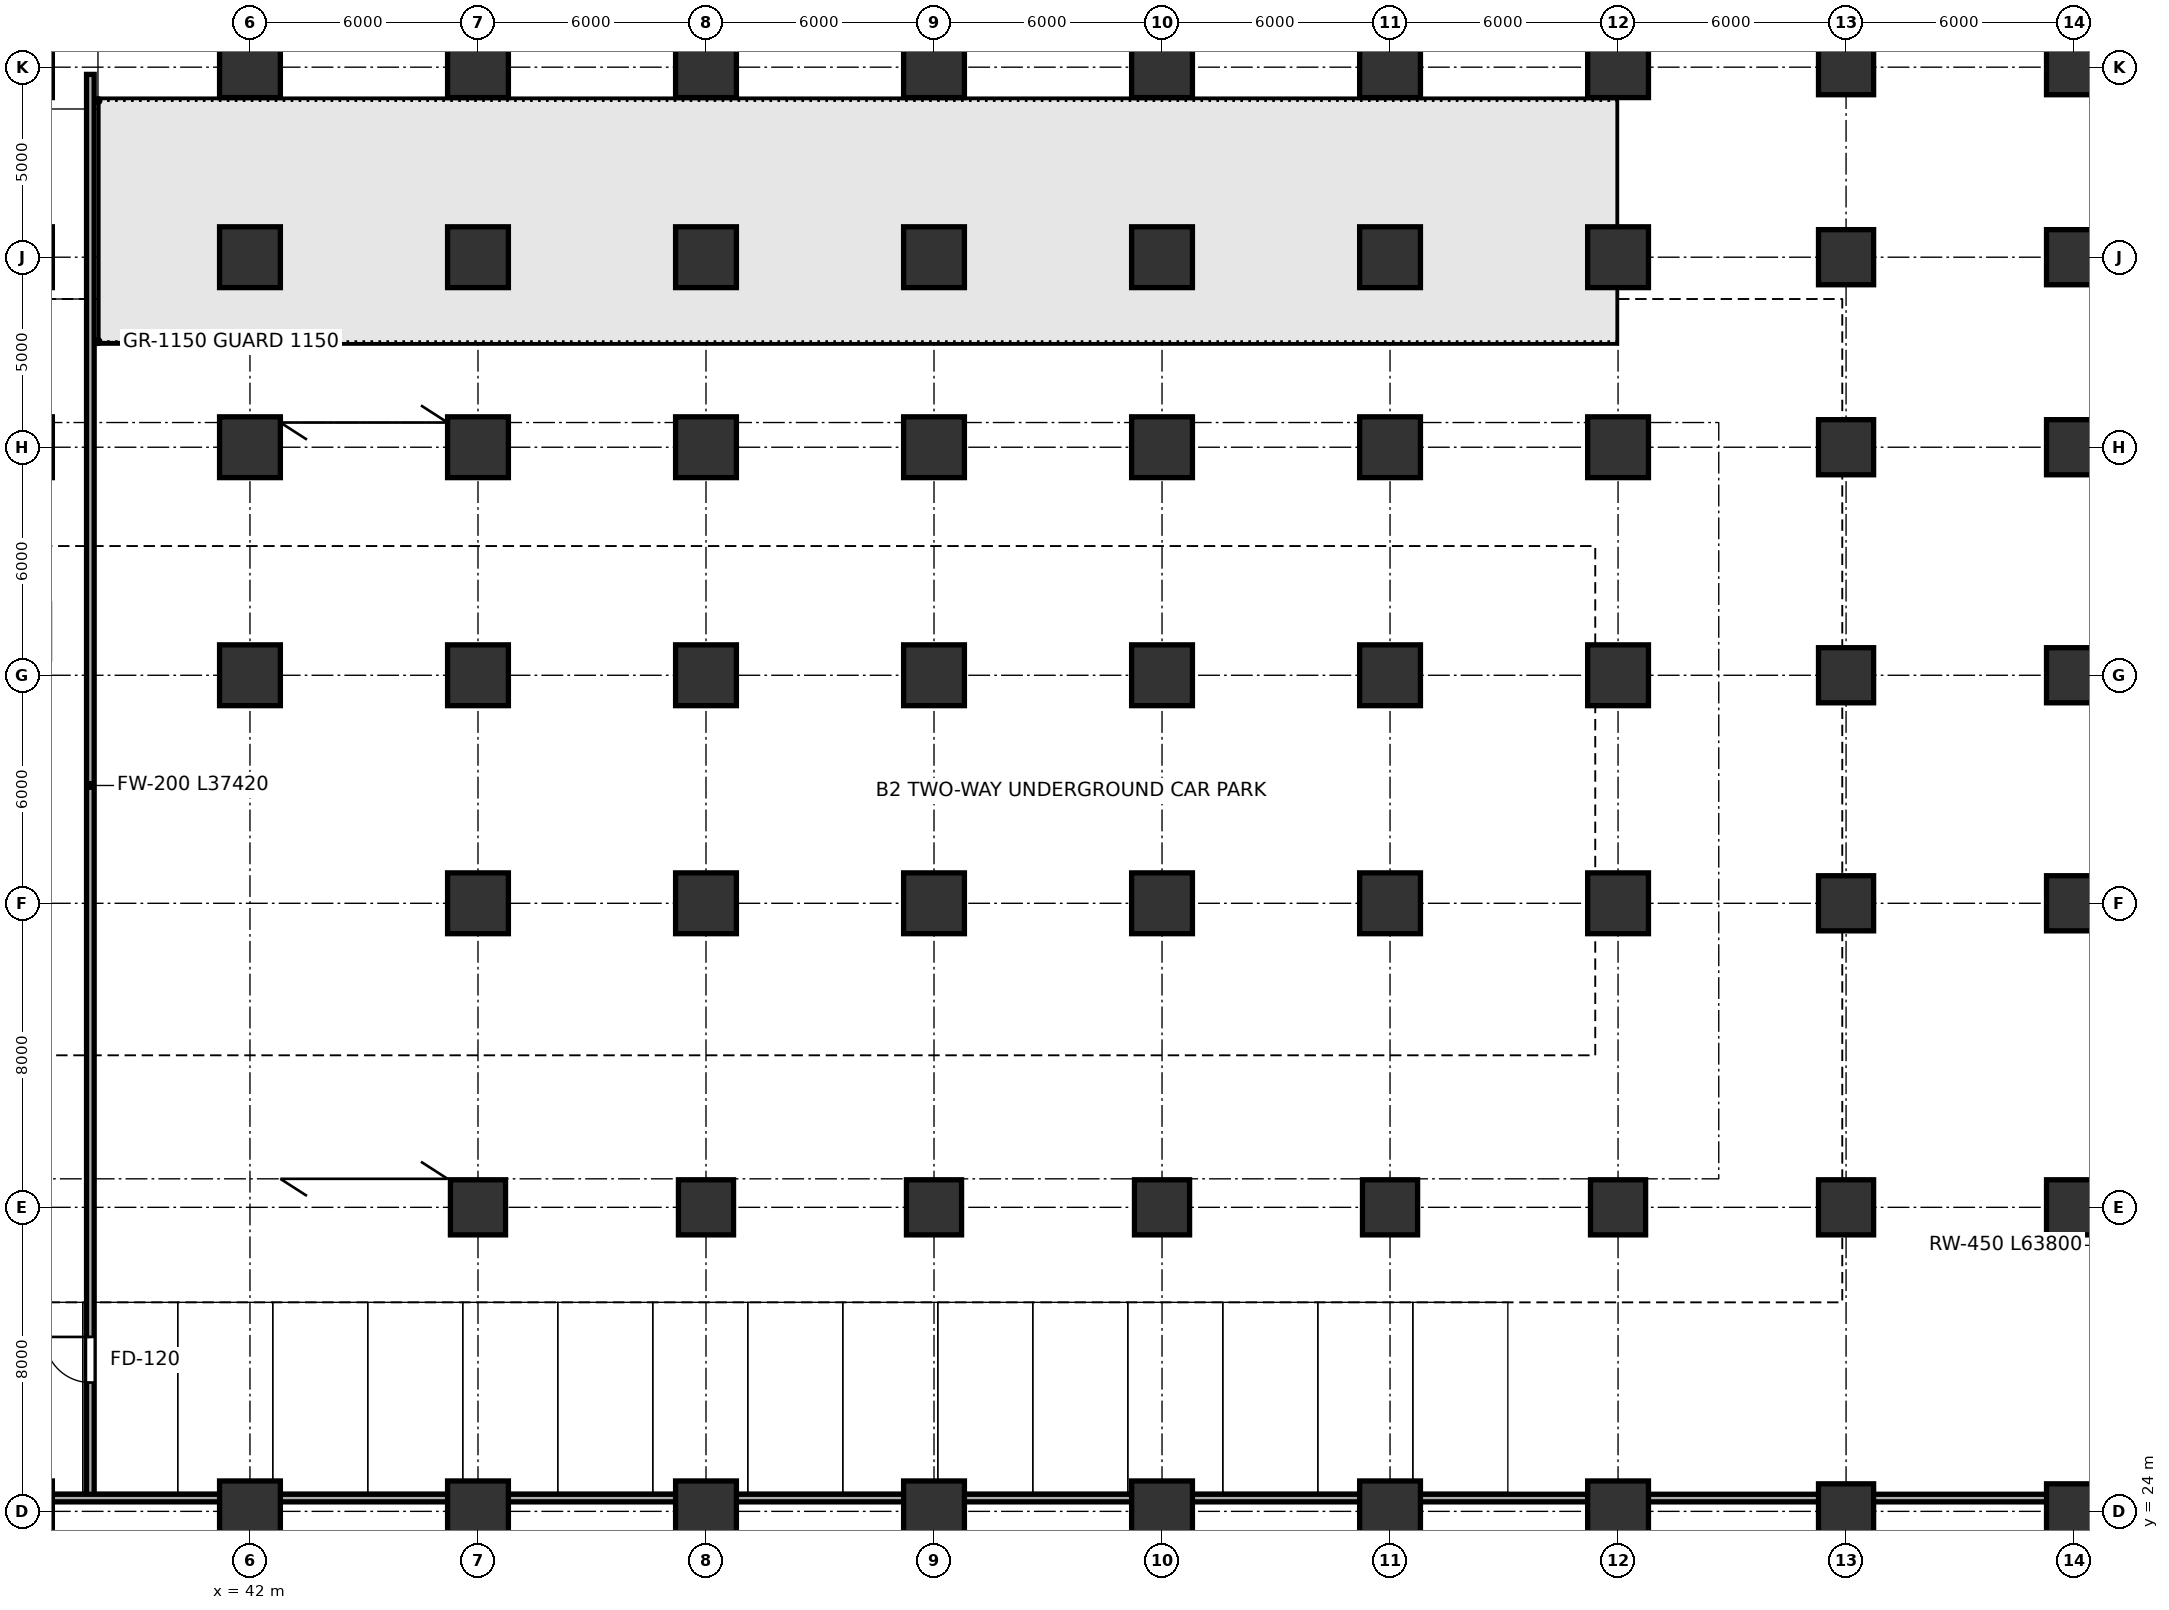
"""IFC4 building model, lengths in metres.
Left out: names, types, materials, properties, quantities, classifications, styles, units other than length and angle.
Written with IfcOpenShell. Run it as: python <this file> out.ifc"""

import sys

from ifc_helpers import new_model, si_unit, direction, frame, frame_2d, origin, origin_2d, place, context, subcontext, project, spatial, rectangle, extrude, source, transform, mapped, element, fill, save


model = new_model("IFC4")
c1 = context("Model", 3, precision=1e-05, world=origin(), true_north=direction((0.0, 1.0)))
c2 = subcontext(c1, "Body", "Model", "MODEL_VIEW")
j1 = project(units=[si_unit("LENGTHUNIT", "METRE"), si_unit("PLANEANGLEUNIT", "RADIAN")], contexts=[c1])
p1 = place(None, origin())
s1 = spatial("IfcSite", under=j1, at=p1, CompositionType="ELEMENT")
p2 = place(p1, origin())
s2 = spatial("IfcBuilding", under=s1, at=p2, CompositionType="ELEMENT")
p3 = place(p2, frame((0.0, 0.0, -9.6)))
s3 = spatial("IfcBuildingStorey", under=s2, at=p3, CompositionType="ELEMENT", Elevation=-9.6)
m1 = source(origin(), c2, "Body", "SweptSolid", [
    extrude(rectangle(XDim=1.6, YDim=1.6, at=origin_2d()), origin(), (0.0, 0.0, 1.0), 4.799),
])
for number, where, z_axis, x_axis in (
    (1, (42.0, 24.0, 0.0), (0.0, 0.0, 1.0), (1.0, 0.0, 0.0)),
    (2, (42.0, 46.0, 0.0), (0.0, 0.0, 1.0), (1.0, 0.0, 0.0)),
    (3, (42.0, 52.0, 0.0), (0.0, 0.0, 1.0), (1.0, 0.0, 0.0)),
    (4, (42.0, 57.0, 0.0), (0.0, 0.0, 1.0), (1.0, 0.0, 0.0)),
):
    element("IfcColumn", number, at=place(p3, frame(where, z_axis=z_axis, x_axis=x_axis)), inside=s3, PredefinedType="COLUMN", context=c2, shape_type="MappedRepresentation", body=[
        mapped(m1, transform((0.0, 0.0, 0.0), scale=1.0)),
    ])
m2 = source(origin(), c2, "Body", "SweptSolid", [
    extrude(rectangle(XDim=1.6, YDim=1.6, at=origin_2d()), origin(), (0.0, 0.0, 1.0), 4.799),
])
p4 = place(p3, frame((42.0, 62.0, 0.0), z_axis=(0.0, 0.0, 1.0), x_axis=(1.0, 0.0, 0.0)))
e5 = element("IfcColumn", 5, at=p4, inside=s3, PredefinedType="COLUMN", context=c2, shape_type="MappedRepresentation", body=[
    mapped(m2, transform((0.0, 0.0, 0.0), scale=1.0)),
])
p5 = place(p3, frame((48.0, 24.0, 0.0), z_axis=(0.0, 0.0, 1.0), x_axis=(1.0, 0.0, 0.0)))
e6 = element("IfcColumn", 6, at=p5, inside=s3, PredefinedType="COLUMN", context=c2, shape_type="MappedRepresentation", body=[
    mapped(m1, transform((0.0, 0.0, 0.0), scale=1.0)),
])
m3 = source(origin(), c2, "Body", "SweptSolid", [
    extrude(rectangle(XDim=1.45, YDim=1.45, at=origin_2d()), origin(), (0.0, 0.0, 1.0), 4.799),
])
p6 = place(p3, frame((48.0, 32.0, 0.0), z_axis=(0.0, 0.0, 1.0), x_axis=(1.0, 0.0, 0.0)))
e7 = element("IfcColumn", 7, at=p6, inside=s3, PredefinedType="COLUMN", context=c2, shape_type="MappedRepresentation", body=[
    mapped(m3, transform((0.0, 0.0, 0.0), scale=1.0)),
])
for number, where, z_axis, x_axis in (
    (8, (48.0, 40.0, 0.0), (0.0, 0.0, 1.0), (1.0, 0.0, 0.0)),
    (9, (48.0, 46.0, 0.0), (0.0, 0.0, 1.0), (1.0, 0.0, 0.0)),
    (10, (48.0, 52.0, 0.0), (0.0, 0.0, 1.0), (1.0, 0.0, 0.0)),
    (11, (48.0, 57.0, 0.0), (0.0, 0.0, 1.0), (1.0, 0.0, 0.0)),
):
    element("IfcColumn", number, at=place(p3, frame(where, z_axis=z_axis, x_axis=x_axis)), inside=s3, PredefinedType="COLUMN", context=c2, shape_type="MappedRepresentation", body=[
        mapped(m1, transform((0.0, 0.0, 0.0), scale=1.0)),
    ])
p7 = place(p3, frame((48.0, 62.0, 0.0), z_axis=(0.0, 0.0, 1.0), x_axis=(1.0, 0.0, 0.0)))
e12 = element("IfcColumn", 12, at=p7, inside=s3, PredefinedType="COLUMN", context=c2, shape_type="MappedRepresentation", body=[
    mapped(m2, transform((0.0, 0.0, 0.0), scale=1.0)),
])
p8 = place(p3, frame((54.0, 24.0, 0.0), z_axis=(0.0, 0.0, 1.0), x_axis=(1.0, 0.0, 0.0)))
e13 = element("IfcColumn", 13, at=p8, inside=s3, PredefinedType="COLUMN", context=c2, shape_type="MappedRepresentation", body=[
    mapped(m1, transform((0.0, 0.0, 0.0), scale=1.0)),
])
p9 = place(p3, frame((54.0, 32.0, 0.0), z_axis=(0.0, 0.0, 1.0), x_axis=(1.0, 0.0, 0.0)))
e14 = element("IfcColumn", 14, at=p9, inside=s3, PredefinedType="COLUMN", context=c2, shape_type="MappedRepresentation", body=[
    mapped(m3, transform((0.0, 0.0, 0.0), scale=1.0)),
])
for number, where, z_axis, x_axis in (
    (15, (54.0, 40.0, 0.0), (0.0, 0.0, 1.0), (1.0, 0.0, 0.0)),
    (16, (54.0, 46.0, 0.0), (0.0, 0.0, 1.0), (1.0, 0.0, 0.0)),
    (17, (54.0, 52.0, 0.0), (0.0, 0.0, 1.0), (1.0, 0.0, 0.0)),
    (18, (54.0, 57.0, 0.0), (0.0, 0.0, 1.0), (1.0, 0.0, 0.0)),
):
    element("IfcColumn", number, at=place(p3, frame(where, z_axis=z_axis, x_axis=x_axis)), inside=s3, PredefinedType="COLUMN", context=c2, shape_type="MappedRepresentation", body=[
        mapped(m1, transform((0.0, 0.0, 0.0), scale=1.0)),
    ])
p10 = place(p3, frame((54.0, 62.0, 0.0), z_axis=(0.0, 0.0, 1.0), x_axis=(1.0, 0.0, 0.0)))
e19 = element("IfcColumn", 19, at=p10, inside=s3, PredefinedType="COLUMN", context=c2, shape_type="MappedRepresentation", body=[
    mapped(m2, transform((0.0, 0.0, 0.0), scale=1.0)),
])
p11 = place(p3, frame((60.0, 24.0, 0.0), z_axis=(0.0, 0.0, 1.0), x_axis=(1.0, 0.0, 0.0)))
e20 = element("IfcColumn", 20, at=p11, inside=s3, PredefinedType="COLUMN", context=c2, shape_type="MappedRepresentation", body=[
    mapped(m1, transform((0.0, 0.0, 0.0), scale=1.0)),
])
p12 = place(p3, frame((60.0, 32.0, 0.0), z_axis=(0.0, 0.0, 1.0), x_axis=(1.0, 0.0, 0.0)))
e21 = element("IfcColumn", 21, at=p12, inside=s3, PredefinedType="COLUMN", context=c2, shape_type="MappedRepresentation", body=[
    mapped(m3, transform((0.0, 0.0, 0.0), scale=1.0)),
])
for number, where, z_axis, x_axis in (
    (22, (60.0, 40.0, 0.0), (0.0, 0.0, 1.0), (1.0, 0.0, 0.0)),
    (23, (60.0, 46.0, 0.0), (0.0, 0.0, 1.0), (1.0, 0.0, 0.0)),
    (24, (60.0, 52.0, 0.0), (0.0, 0.0, 1.0), (1.0, 0.0, 0.0)),
    (25, (60.0, 57.0, 0.0), (0.0, 0.0, 1.0), (1.0, 0.0, 0.0)),
):
    element("IfcColumn", number, at=place(p3, frame(where, z_axis=z_axis, x_axis=x_axis)), inside=s3, PredefinedType="COLUMN", context=c2, shape_type="MappedRepresentation", body=[
        mapped(m1, transform((0.0, 0.0, 0.0), scale=1.0)),
    ])
p13 = place(p3, frame((60.0, 62.0, 0.0), z_axis=(0.0, 0.0, 1.0), x_axis=(1.0, 0.0, 0.0)))
e26 = element("IfcColumn", 26, at=p13, inside=s3, PredefinedType="COLUMN", context=c2, shape_type="MappedRepresentation", body=[
    mapped(m2, transform((0.0, 0.0, 0.0), scale=1.0)),
])
p14 = place(p3, frame((66.0, 24.0, 0.0), z_axis=(0.0, 0.0, 1.0), x_axis=(1.0, 0.0, 0.0)))
e27 = element("IfcColumn", 27, at=p14, inside=s3, PredefinedType="COLUMN", context=c2, shape_type="MappedRepresentation", body=[
    mapped(m1, transform((0.0, 0.0, 0.0), scale=1.0)),
])
p15 = place(p3, frame((66.0, 32.0, 0.0), z_axis=(0.0, 0.0, 1.0), x_axis=(1.0, 0.0, 0.0)))
e28 = element("IfcColumn", 28, at=p15, inside=s3, PredefinedType="COLUMN", context=c2, shape_type="MappedRepresentation", body=[
    mapped(m3, transform((0.0, 0.0, 0.0), scale=1.0)),
])
for number, where, z_axis, x_axis in (
    (29, (66.0, 40.0, 0.0), (0.0, 0.0, 1.0), (1.0, 0.0, 0.0)),
    (30, (66.0, 46.0, 0.0), (0.0, 0.0, 1.0), (1.0, 0.0, 0.0)),
    (31, (66.0, 52.0, 0.0), (0.0, 0.0, 1.0), (1.0, 0.0, 0.0)),
    (32, (66.0, 57.0, 0.0), (0.0, 0.0, 1.0), (1.0, 0.0, 0.0)),
):
    element("IfcColumn", number, at=place(p3, frame(where, z_axis=z_axis, x_axis=x_axis)), inside=s3, PredefinedType="COLUMN", context=c2, shape_type="MappedRepresentation", body=[
        mapped(m1, transform((0.0, 0.0, 0.0), scale=1.0)),
    ])
p16 = place(p3, frame((66.0, 62.0, 0.0), z_axis=(0.0, 0.0, 1.0), x_axis=(1.0, 0.0, 0.0)))
e33 = element("IfcColumn", 33, at=p16, inside=s3, PredefinedType="COLUMN", context=c2, shape_type="MappedRepresentation", body=[
    mapped(m2, transform((0.0, 0.0, 0.0), scale=1.0)),
])
p17 = place(p3, frame((72.0, 24.0, 0.0), z_axis=(0.0, 0.0, 1.0), x_axis=(1.0, 0.0, 0.0)))
e34 = element("IfcColumn", 34, at=p17, inside=s3, PredefinedType="COLUMN", context=c2, shape_type="MappedRepresentation", body=[
    mapped(m1, transform((0.0, 0.0, 0.0), scale=1.0)),
])
p18 = place(p3, frame((72.0, 32.0, 0.0), z_axis=(0.0, 0.0, 1.0), x_axis=(1.0, 0.0, 0.0)))
e35 = element("IfcColumn", 35, at=p18, inside=s3, PredefinedType="COLUMN", context=c2, shape_type="MappedRepresentation", body=[
    mapped(m3, transform((0.0, 0.0, 0.0), scale=1.0)),
])
for number, where, z_axis, x_axis in (
    (36, (72.0, 40.0, 0.0), (0.0, 0.0, 1.0), (1.0, 0.0, 0.0)),
    (37, (72.0, 46.0, 0.0), (0.0, 0.0, 1.0), (1.0, 0.0, 0.0)),
    (38, (72.0, 52.0, 0.0), (0.0, 0.0, 1.0), (1.0, 0.0, 0.0)),
    (39, (72.0, 57.0, 0.0), (0.0, 0.0, 1.0), (1.0, 0.0, 0.0)),
):
    element("IfcColumn", number, at=place(p3, frame(where, z_axis=z_axis, x_axis=x_axis)), inside=s3, PredefinedType="COLUMN", context=c2, shape_type="MappedRepresentation", body=[
        mapped(m1, transform((0.0, 0.0, 0.0), scale=1.0)),
    ])
p19 = place(p3, frame((72.0, 62.0, 0.0), z_axis=(0.0, 0.0, 1.0), x_axis=(1.0, 0.0, 0.0)))
e40 = element("IfcColumn", 40, at=p19, inside=s3, PredefinedType="COLUMN", context=c2, shape_type="MappedRepresentation", body=[
    mapped(m2, transform((0.0, 0.0, 0.0), scale=1.0)),
])
p20 = place(p3, frame((78.0, 24.0, 0.0), z_axis=(0.0, 0.0, 1.0), x_axis=(1.0, 0.0, 0.0)))
e41 = element("IfcColumn", 41, at=p20, inside=s3, PredefinedType="COLUMN", context=c2, shape_type="MappedRepresentation", body=[
    mapped(m1, transform((0.0, 0.0, 0.0), scale=1.0)),
])
p21 = place(p3, frame((78.0, 32.0, 0.0), z_axis=(0.0, 0.0, 1.0), x_axis=(1.0, 0.0, 0.0)))
e42 = element("IfcColumn", 42, at=p21, inside=s3, PredefinedType="COLUMN", context=c2, shape_type="MappedRepresentation", body=[
    mapped(m3, transform((0.0, 0.0, 0.0), scale=1.0)),
])
for number, where, z_axis, x_axis in (
    (43, (78.0, 40.0, 0.0), (0.0, 0.0, 1.0), (1.0, 0.0, 0.0)),
    (44, (78.0, 46.0, 0.0), (0.0, 0.0, 1.0), (1.0, 0.0, 0.0)),
    (45, (78.0, 52.0, 0.0), (0.0, 0.0, 1.0), (1.0, 0.0, 0.0)),
    (46, (78.0, 57.0, 0.0), (0.0, 0.0, 1.0), (1.0, 0.0, 0.0)),
):
    element("IfcColumn", number, at=place(p3, frame(where, z_axis=z_axis, x_axis=x_axis)), inside=s3, PredefinedType="COLUMN", context=c2, shape_type="MappedRepresentation", body=[
        mapped(m1, transform((0.0, 0.0, 0.0), scale=1.0)),
    ])
p22 = place(p3, frame((78.0, 62.0, 0.0), z_axis=(0.0, 0.0, 1.0), x_axis=(1.0, 0.0, 0.0)))
e47 = element("IfcColumn", 47, at=p22, inside=s3, PredefinedType="COLUMN", context=c2, shape_type="MappedRepresentation", body=[
    mapped(m2, transform((0.0, 0.0, 0.0), scale=1.0)),
])
for number, where, z_axis, x_axis in (
    (48, (84.0, 24.0, 0.0), (0.0, 0.0, 1.0), (1.0, 0.0, 0.0)),
    (49, (84.0, 32.0, 0.0), (0.0, 0.0, 1.0), (1.0, 0.0, 0.0)),
    (50, (84.0, 40.0, 0.0), (0.0, 0.0, 1.0), (1.0, 0.0, 0.0)),
    (51, (84.0, 46.0, 0.0), (0.0, 0.0, 1.0), (1.0, 0.0, 0.0)),
    (52, (84.0, 52.0, 0.0), (0.0, 0.0, 1.0), (1.0, 0.0, 0.0)),
    (53, (84.0, 57.0, 0.0), (0.0, 0.0, 1.0), (1.0, 0.0, 0.0)),
):
    element("IfcColumn", number, at=place(p3, frame(where, z_axis=z_axis, x_axis=x_axis)), inside=s3, PredefinedType="COLUMN", context=c2, shape_type="MappedRepresentation", body=[
        mapped(m3, transform((0.0, 0.0, 0.0), scale=1.0)),
    ])
m4 = source(origin(), c2, "Body", "SweptSolid", [
    extrude(rectangle(XDim=1.45, YDim=1.45, at=origin_2d()), origin(), (0.0, 0.0, 1.0), 4.799),
])
for number, where, z_axis, x_axis in (
    (54, (84.0, 62.0, 0.0), (0.0, 0.0, 1.0), (1.0, 0.0, 0.0)),
    (55, (90.0, 24.0, 0.0), (0.0, 0.0, 1.0), (1.0, 0.0, 0.0)),
    (56, (90.0, 32.0, 0.0), (0.0, 0.0, 1.0), (1.0, 0.0, 0.0)),
    (57, (90.0, 40.0, 0.0), (0.0, 0.0, 1.0), (1.0, 0.0, 0.0)),
    (58, (90.0, 46.0, 0.0), (0.0, 0.0, 1.0), (1.0, 0.0, 0.0)),
    (59, (90.0, 52.0, 0.0), (0.0, 0.0, 1.0), (1.0, 0.0, 0.0)),
    (60, (90.0, 57.0, 0.0), (0.0, 0.0, 1.0), (1.0, 0.0, 0.0)),
    (61, (90.0, 62.0, 0.0), (0.0, 0.0, 1.0), (1.0, 0.0, 0.0)),
):
    element("IfcColumn", number, at=place(p3, frame(where, z_axis=z_axis, x_axis=x_axis)), inside=s3, PredefinedType="COLUMN", context=c2, shape_type="MappedRepresentation", body=[
        mapped(m4, transform((0.0, 0.0, 0.0), scale=1.0)),
    ])
p23 = place(p3, frame((37.8, 24.39, 0.0), z_axis=(0.0, 0.0, 1.0), x_axis=(0.0, 1.0, 0.0)))
e62 = element("IfcWall", 62, at=p23, inside=s3, PredefinedType="SOLIDWALL", context=c2, shape_type="SweptSolid", body=[
    extrude(rectangle(XDim=37.42, YDim=0.2, at=frame_2d((18.71, 0.0))), origin(), (0.0, 0.0, 1.0), 3.655),
])
p24 = place(p23, frame((3.0, 0.0, 0.0)))
e63 = element("IfcOpeningElement", 63, at=p24, cuts=e62, PredefinedType="OPENING", context=c2, shape_type="SweptSolid", body=[
    extrude(rectangle(XDim=1.2, YDim=2.2, at=frame_2d((0.6, 1.1))), frame((0.0, 0.11, 0.0), z_axis=(0.0, -1.0, 0.0), x_axis=(1.0, 0.0, 0.0)), (0.0, 0.0, 1.0), 0.22),
])
p25 = place(p3, frame((27.24, 24.35, 0.0), z_axis=(0.0, 0.0, 1.0), x_axis=(1.0, 0.0, 0.0)))
e64 = element("IfcWall", 64, at=p25, inside=s3, PredefinedType="SOLIDWALL", context=c2, shape_type="SweptSolid", body=[
    extrude(rectangle(XDim=62.22, YDim=0.2, at=frame_2d((31.11, 0.0))), origin(), (0.0, 0.0, 1.0), 3.65),
])
p26 = place(p3, frame((47.9, -0.56, 0.0), z_axis=(0.0, 0.0, 1.0), x_axis=(0.0, 1.0, 0.0)))
e65 = element("IfcWall", 65, at=p26, inside=s3, PredefinedType="SOLIDWALL", context=c2, shape_type="SweptSolid", body=[
    extrude(rectangle(XDim=24.87, YDim=0.2, at=frame_2d((12.435, 0.0))), origin(), (0.0, 0.0, 1.0), 3.655),
])
p27 = place(p26, frame((4.0, 0.0, 0.0)))
e66 = element("IfcOpeningElement", 66, at=p27, cuts=e65, PredefinedType="OPENING", context=c2, shape_type="SweptSolid", body=[
    extrude(rectangle(XDim=1.2, YDim=2.2, at=frame_2d((0.6, 1.1))), frame((0.0, 0.11, 0.0), z_axis=(0.0, -1.0, 0.0), x_axis=(1.0, 0.0, 0.0)), (0.0, 0.0, 1.0), 0.22),
])
m5 = source(origin(), c2, "Body", "SweptSolid", [
    extrude(rectangle(XDim=1.2, YDim=2.2, at=frame_2d((0.6, 1.1))), frame((0.0, 0.025, 0.0), z_axis=(0.0, -1.0, 0.0), x_axis=(1.0, 0.0, 0.0)), (0.0, 0.0, 1.0), 0.05),
])
p28 = place(p24, origin())
e67 = element("IfcDoor", 67, at=p28, inside=s3, OperationType="SINGLE_SWING_RIGHT", PredefinedType="DOOR", context=c2, shape_type="MappedRepresentation", body=[
    mapped(m5, transform((0.0, 0.0, 0.0), scale=1.0)),
])
fill(e63, e67)
save(model, sys.argv[1])
